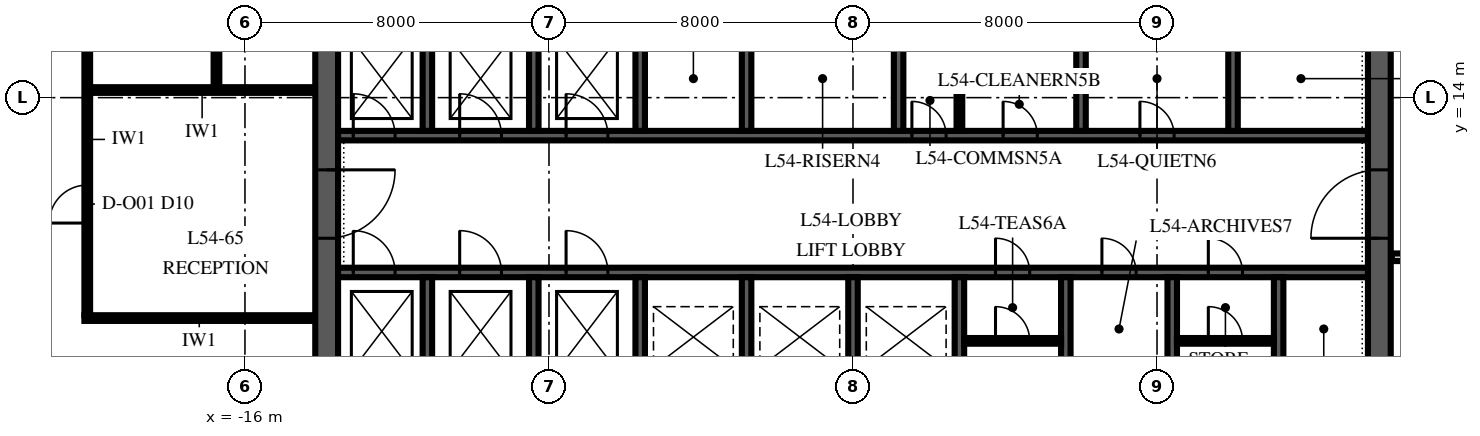
"""IFC4 building model, lengths in metres.
Left out: names, types, materials, properties, quantities, classifications, styles, units other than length and angle.
Written with IfcOpenShell. Run it as: python <this file> out.ifc"""

import sys

from ifc_helpers import new_model, si_unit, direction, frame, frame_2d, origin, place, context, subcontext, project, spatial, polyline, rectangle, outline, extrude, element, fill, save


model = new_model("IFC4")
c1 = context("Model", 3, precision=1e-05, world=origin(), true_north=direction((0.0, 1.0)))
c2 = subcontext(c1, "Body", "Model", "MODEL_VIEW")
j1 = project(units=[si_unit("LENGTHUNIT", "METRE"), si_unit("PLANEANGLEUNIT", "RADIAN")], contexts=[c1])
p1 = place(None, origin())
s1 = spatial("IfcSite", under=j1, at=p1, CompositionType="ELEMENT")
p2 = place(p1, origin())
s2 = spatial("IfcBuilding", under=s1, at=p2, CompositionType="ELEMENT")
p3 = place(p2, frame((0.0, 0.0, 234.0)))
s3 = spatial("IfcBuildingStorey", under=s2, at=p3, CompositionType="ELEMENT", Elevation=234.0)
p4 = place(p3, frame((13.85, 6.15, 0.0), z_axis=(0.0, 0.0, 1.0), x_axis=(0.0, 1.0, 0.0)))
e1 = element("IfcWall", 1, at=p4, inside=s3, PredefinedType="SHEAR", context=c2, shape_type="SweptSolid", body=[
    extrude(outline(polyline([(0.0, -0.3), (17.7, -0.3), (17.7, 0.0), (17.4, 0.0), (17.4, 0.3), (0.3, 0.3), (0.3, 0.0), (0.0, 0.0), (0.0, -0.3)])), origin(), (0.0, 0.0, 1.0), 4.0),
])
p5 = place(p4, frame((4.15, 0.0, 0.0)))
e2 = element("IfcOpeningElement", 2, at=p5, cuts=e1, PredefinedType="OPENING", context=c2, shape_type="SweptSolid", body=[
    extrude(rectangle(XDim=1.8, YDim=2.4, at=frame_2d((0.9, 1.2))), frame((0.0, 0.315, 0.0), z_axis=(0.0, -1.0, 0.0), x_axis=(1.0, 0.0, 0.0)), (0.0, 0.0, 1.0), 0.63),
])
p6 = place(p3, frame((-13.85, 23.85, 0.0), z_axis=(0.0, 0.0, 1.0), x_axis=(0.0, -1.0, 0.0)))
e3 = element("IfcWall", 3, at=p6, inside=s3, PredefinedType="SHEAR", context=c2, shape_type="SweptSolid", body=[
    extrude(outline(polyline([(0.0, -0.3), (17.7, -0.3), (17.7, 0.0), (17.4, 0.0), (17.4, 0.3), (0.3, 0.3), (0.3, 0.0), (0.0, 0.0), (0.0, -0.3)])), origin(), (0.0, 0.0, 1.0), 4.0),
])
p7 = place(p6, frame((11.75, 0.0, 0.0)))
e4 = element("IfcOpeningElement", 4, at=p7, cuts=e3, PredefinedType="OPENING", context=c2, shape_type="SweptSolid", body=[
    extrude(rectangle(XDim=1.8, YDim=2.4, at=frame_2d((0.9, 1.2))), frame((0.0, 0.315, 0.0), z_axis=(0.0, -1.0, 0.0), x_axis=(1.0, 0.0, 0.0)), (0.0, 0.0, 1.0), 0.63),
])
p8 = place(p3, frame((-13.55, 9.4, 0.0), z_axis=(0.0, 0.0, 1.0), x_axis=(1.0, 0.0, 0.0)))
e5 = element("IfcWall", 5, at=p8, inside=s3, PredefinedType="SHEAR", context=c2, shape_type="SweptSolid", body=[
    extrude(rectangle(XDim=27.1, YDim=0.25, at=frame_2d((13.55, 0.0))), origin(), (0.0, 0.0, 1.0), 4.0),
])
p9 = place(p8, frame((0.4, 0.0, 0.0)))
e6 = element("IfcOpeningElement", 6, at=p9, cuts=e5, PredefinedType="OPENING", context=c2, shape_type="SweptSolid", body=[
    extrude(rectangle(XDim=1.1, YDim=2.1, at=frame_2d((0.55, 1.05))), frame((0.0, 0.14, 0.0), z_axis=(0.0, -1.0, 0.0), x_axis=(1.0, 0.0, 0.0)), (0.0, 0.0, 1.0), 0.28),
])
p10 = place(p8, frame((3.2, 0.0, 0.0)))
e7 = element("IfcOpeningElement", 7, at=p10, cuts=e5, PredefinedType="OPENING", context=c2, shape_type="SweptSolid", body=[
    extrude(rectangle(XDim=1.1, YDim=2.1, at=frame_2d((0.55, 1.05))), frame((0.0, 0.14, 0.0), z_axis=(0.0, -1.0, 0.0), x_axis=(1.0, 0.0, 0.0)), (0.0, 0.0, 1.0), 0.28),
])
p11 = place(p8, frame((6.0, 0.0, 0.0)))
e8 = element("IfcOpeningElement", 8, at=p11, cuts=e5, PredefinedType="OPENING", context=c2, shape_type="SweptSolid", body=[
    extrude(rectangle(XDim=1.1, YDim=2.1, at=frame_2d((0.55, 1.05))), frame((0.0, 0.14, 0.0), z_axis=(0.0, -1.0, 0.0), x_axis=(1.0, 0.0, 0.0)), (0.0, 0.0, 1.0), 0.28),
])
p12 = place(p8, frame((17.3, 0.0, 0.0)))
e9 = element("IfcOpeningElement", 9, at=p12, cuts=e5, PredefinedType="OPENING", context=c2, shape_type="SweptSolid", body=[
    extrude(rectangle(XDim=0.9, YDim=2.1, at=frame_2d((0.45, 1.05))), frame((0.0, 0.14, 0.0), z_axis=(0.0, -1.0, 0.0), x_axis=(1.0, 0.0, 0.0)), (0.0, 0.0, 1.0), 0.28),
])
p13 = place(p8, frame((20.1, 0.0, 0.0)))
e10 = element("IfcOpeningElement", 10, at=p13, cuts=e5, PredefinedType="OPENING", context=c2, shape_type="SweptSolid", body=[
    extrude(rectangle(XDim=0.9, YDim=2.1, at=frame_2d((0.45, 1.05))), frame((0.0, 0.14, 0.0), z_axis=(0.0, -1.0, 0.0), x_axis=(1.0, 0.0, 0.0)), (0.0, 0.0, 1.0), 0.28),
])
p14 = place(p8, frame((22.9, 0.0, 0.0)))
e11 = element("IfcOpeningElement", 11, at=p14, cuts=e5, PredefinedType="OPENING", context=c2, shape_type="SweptSolid", body=[
    extrude(rectangle(XDim=0.9, YDim=2.1, at=frame_2d((0.45, 1.05))), frame((0.0, 0.14, 0.0), z_axis=(0.0, -1.0, 0.0), x_axis=(1.0, 0.0, 0.0)), (0.0, 0.0, 1.0), 0.28),
])
p15 = place(p3, frame((-13.55, 13.0, 0.0), z_axis=(0.0, 0.0, 1.0), x_axis=(1.0, 0.0, 0.0)))
e12 = element("IfcWall", 12, at=p15, inside=s3, PredefinedType="SHEAR", context=c2, shape_type="SweptSolid", body=[
    extrude(rectangle(XDim=27.1, YDim=0.25, at=frame_2d((13.55, 0.0))), origin(), (0.0, 0.0, 1.0), 4.0),
])
p16 = place(p15, frame((0.4, 0.0, 0.0)))
e13 = element("IfcOpeningElement", 13, at=p16, cuts=e12, PredefinedType="OPENING", context=c2, shape_type="SweptSolid", body=[
    extrude(rectangle(XDim=1.1, YDim=2.1, at=frame_2d((0.55, 1.05))), frame((0.0, 0.14, 0.0), z_axis=(0.0, -1.0, 0.0), x_axis=(1.0, 0.0, 0.0)), (0.0, 0.0, 1.0), 0.28),
])
p17 = place(p15, frame((3.2, 0.0, 0.0)))
e14 = element("IfcOpeningElement", 14, at=p17, cuts=e12, PredefinedType="OPENING", context=c2, shape_type="SweptSolid", body=[
    extrude(rectangle(XDim=1.1, YDim=2.1, at=frame_2d((0.55, 1.05))), frame((0.0, 0.14, 0.0), z_axis=(0.0, -1.0, 0.0), x_axis=(1.0, 0.0, 0.0)), (0.0, 0.0, 1.0), 0.28),
])
p18 = place(p15, frame((6.0, 0.0, 0.0)))
e15 = element("IfcOpeningElement", 15, at=p18, cuts=e12, PredefinedType="OPENING", context=c2, shape_type="SweptSolid", body=[
    extrude(rectangle(XDim=1.1, YDim=2.1, at=frame_2d((0.55, 1.05))), frame((0.0, 0.14, 0.0), z_axis=(0.0, -1.0, 0.0), x_axis=(1.0, 0.0, 0.0)), (0.0, 0.0, 1.0), 0.28),
])
p19 = place(p15, frame((15.1, 0.0, 0.0)))
e16 = element("IfcOpeningElement", 16, at=p19, cuts=e12, PredefinedType="OPENING", context=c2, shape_type="SweptSolid", body=[
    extrude(rectangle(XDim=0.9, YDim=2.1, at=frame_2d((0.45, 1.05))), frame((0.0, 0.14, 0.0), z_axis=(0.0, -1.0, 0.0), x_axis=(1.0, 0.0, 0.0)), (0.0, 0.0, 1.0), 0.28),
])
p20 = place(p15, frame((17.5, 0.0, 0.0)))
e17 = element("IfcOpeningElement", 17, at=p20, cuts=e12, PredefinedType="OPENING", context=c2, shape_type="SweptSolid", body=[
    extrude(rectangle(XDim=0.9, YDim=2.1, at=frame_2d((0.45, 1.05))), frame((0.0, 0.14, 0.0), z_axis=(0.0, -1.0, 0.0), x_axis=(1.0, 0.0, 0.0)), (0.0, 0.0, 1.0), 0.28),
])
p21 = place(p15, frame((21.1, 0.0, 0.0)))
e18 = element("IfcOpeningElement", 18, at=p21, cuts=e12, PredefinedType="OPENING", context=c2, shape_type="SweptSolid", body=[
    extrude(rectangle(XDim=0.9, YDim=2.1, at=frame_2d((0.45, 1.05))), frame((0.0, 0.14, 0.0), z_axis=(0.0, -1.0, 0.0), x_axis=(1.0, 0.0, 0.0)), (0.0, 0.0, 1.0), 0.28),
])
for number, where, z_axis, x_axis in (
    (19, (-11.2, 6.45, 0.0), (0.0, 0.0, 1.0), (0.0, 1.0, 0.0)),
    (20, (-8.4, 6.45, 0.0), (0.0, 0.0, 1.0), (0.0, 1.0, 0.0)),
    (21, (-5.6, 6.45, 0.0), (0.0, 0.0, 1.0), (0.0, 1.0, 0.0)),
    (22, (-2.8, 6.45, 0.0), (0.0, 0.0, 1.0), (0.0, 1.0, 0.0)),
    (23, (0.0, 6.45, 0.0), (0.0, 0.0, 1.0), (0.0, 1.0, 0.0)),
    (24, (2.8, 6.45, 0.0), (0.0, 0.0, 1.0), (0.0, 1.0, 0.0)),
    (25, (5.6, 6.45, 0.0), (0.0, 0.0, 1.0), (0.0, 1.0, 0.0)),
    (26, (8.4, 6.45, 0.0), (0.0, 0.0, 1.0), (0.0, 1.0, 0.0)),
    (27, (11.2, 6.45, 0.0), (0.0, 0.0, 1.0), (0.0, 1.0, 0.0)),
):
    element("IfcWall", number, at=place(p3, frame(where, z_axis=z_axis, x_axis=x_axis)), inside=s3, PredefinedType="SHEAR", context=c2, shape_type="SweptSolid", body=[
        extrude(rectangle(XDim=2.825, YDim=0.25, at=frame_2d((1.413, 0.0))), origin(), (0.0, 0.0, 1.0), 4.0),
    ])
for number, where, z_axis, x_axis in (
    (28, (-11.2, 13.125, 0.0), (0.0, 0.0, 1.0), (0.0, 1.0, 0.0)),
    (29, (-8.4, 13.125, 0.0), (0.0, 0.0, 1.0), (0.0, 1.0, 0.0)),
    (30, (-5.6, 13.125, 0.0), (0.0, 0.0, 1.0), (0.0, 1.0, 0.0)),
    (31, (-2.8, 13.125, 0.0), (0.0, 0.0, 1.0), (0.0, 1.0, 0.0)),
    (32, (1.2, 13.125, 0.0), (0.0, 0.0, 1.0), (0.0, 1.0, 0.0)),
    (33, (6.0, 13.125, 0.0), (0.0, 0.0, 1.0), (0.0, 1.0, 0.0)),
    (34, (10.0, 13.125, 0.0), (0.0, 0.0, 1.0), (0.0, 1.0, 0.0)),
):
    element("IfcWall", number, at=place(p3, frame(where, z_axis=z_axis, x_axis=x_axis)), inside=s3, PredefinedType="SHEAR", context=c2, shape_type="SweptSolid", body=[
        extrude(rectangle(XDim=2.75, YDim=0.25, at=frame_2d((1.375, 0.0))), origin(), (0.0, 0.0, 1.0), 4.0),
    ])
p22 = place(p3, frame((2.8, 13.125, 0.0), z_axis=(0.0, 0.0, 1.0), x_axis=(0.0, 1.0, 0.0)))
e35 = element("IfcWall", 35, at=p22, inside=s3, PredefinedType="PARTITIONING", context=c2, shape_type="SweptSolid", body=[
    extrude(rectangle(XDim=1.55, YDim=0.15, at=frame_2d((0.775, 0.0))), origin(), (0.0, 0.0, 1.0), 3.85),
])
p23 = place(p3, frame((2.875, 14.6, 0.0), z_axis=(0.0, 0.0, 1.0), x_axis=(1.0, 0.0, 0.0)))
e36 = element("IfcWall", 36, at=p23, inside=s3, PredefinedType="PARTITIONING", context=c2, shape_type="SweptSolid", body=[
    extrude(rectangle(XDim=3.0, YDim=0.15, at=frame_2d((1.5, 0.0))), origin(), (0.0, 0.0, 1.0), 3.85),
])
p24 = place(p3, frame((2.925, 7.6, 0.0), z_axis=(0.0, 0.0, 1.0), x_axis=(1.0, 0.0, 0.0)))
e37 = element("IfcWall", 37, at=p24, inside=s3, PredefinedType="PARTITIONING", context=c2, shape_type="SweptSolid", body=[
    extrude(rectangle(XDim=2.55, YDim=0.15, at=frame_2d((1.275, 0.0))), origin(), (0.0, 0.0, 1.0), 3.85),
])
p25 = place(p24, frame((0.825, 0.0, 0.0)))
e38 = element("IfcOpeningElement", 38, at=p25, cuts=e37, PredefinedType="OPENING", context=c2, shape_type="SweptSolid", body=[
    extrude(rectangle(XDim=0.9, YDim=2.1, at=frame_2d((0.45, 1.05))), frame((0.0, 0.09, 0.0), z_axis=(0.0, -1.0, 0.0), x_axis=(1.0, 0.0, 0.0)), (0.0, 0.0, 1.0), 0.18),
])
p26 = place(p3, frame((8.525, 7.6, 0.0), z_axis=(0.0, 0.0, 1.0), x_axis=(1.0, 0.0, 0.0)))
e39 = element("IfcWall", 39, at=p26, inside=s3, PredefinedType="PARTITIONING", context=c2, shape_type="SweptSolid", body=[
    extrude(rectangle(XDim=2.55, YDim=0.15, at=frame_2d((1.275, 0.0))), origin(), (0.0, 0.0, 1.0), 3.85),
])
p27 = place(p26, frame((0.825, 0.0, 0.0)))
e40 = element("IfcOpeningElement", 40, at=p27, cuts=e39, PredefinedType="OPENING", context=c2, shape_type="SweptSolid", body=[
    extrude(rectangle(XDim=0.9, YDim=2.1, at=frame_2d((0.45, 1.05))), frame((0.0, 0.09, 0.0), z_axis=(0.0, -1.0, 0.0), x_axis=(1.0, 0.0, 0.0)), (0.0, 0.0, 1.0), 0.18),
])
p28 = place(p3, frame((-20.225, 8.2, 0.0), z_axis=(0.0, 0.0, 1.0), x_axis=(1.0, 0.0, 0.0)))
e41 = element("IfcWall", 41, at=p28, inside=s3, PredefinedType="PARTITIONING", context=c2, shape_type="SweptSolid", body=[
    extrude(rectangle(XDim=6.045, YDim=0.15, at=frame_2d((3.022, 0.0))), origin(), (0.0, 0.0, 1.0), 3.85),
])
p29 = place(p3, frame((14.18, 9.8, 0.0), z_axis=(0.0, 0.0, 1.0), x_axis=(1.0, 0.0, 0.0)))
e42 = element("IfcWall", 42, at=p29, inside=s3, PredefinedType="PARTITIONING", context=c2, shape_type="SweptSolid", body=[
    extrude(rectangle(XDim=2.02, YDim=0.2, at=frame_2d((1.01, 0.0))), origin(), (0.0, 0.0, 1.0), 3.85),
])
p30 = place(p3, frame((-20.075, 14.2, 0.0), z_axis=(0.0, 0.0, 1.0), x_axis=(1.0, 0.0, 0.0)))
e43 = element("IfcWall", 43, at=p30, inside=s3, PredefinedType="PARTITIONING", context=c2, shape_type="SweptSolid", body=[
    extrude(rectangle(XDim=5.895, YDim=0.15, at=frame_2d((2.948, 0.0))), origin(), (0.0, 0.0, 1.0), 3.25),
])
p31 = place(p3, frame((-20.15, 8.275, 0.0), z_axis=(0.0, 0.0, 1.0), x_axis=(0.0, 1.0, 0.0)))
e44 = element("IfcWall", 44, at=p31, inside=s3, PredefinedType="PARTITIONING", context=c2, shape_type="SweptSolid", body=[
    extrude(rectangle(XDim=9.25, YDim=0.15, at=frame_2d((4.625, 0.0))), origin(), (0.0, 0.0, 1.0), 3.25),
])
p32 = place(p31, frame((2.425, 0.0, 0.0)))
e45 = element("IfcOpeningElement", 45, at=p32, cuts=e44, PredefinedType="OPENING", context=c2, shape_type="SweptSolid", body=[
    extrude(rectangle(XDim=1.0, YDim=2.3, at=frame_2d((0.5, 1.15))), frame((0.0, 0.09, 0.0), z_axis=(0.0, -1.0, 0.0), x_axis=(1.0, 0.0, 0.0)), (0.0, 0.0, 1.0), 0.18),
])
p33 = place(p31, frame((7.125, 0.0, 0.0)))
e46 = element("IfcOpeningElement", 46, at=p33, cuts=e44, PredefinedType="OPENING", context=c2, shape_type="SweptSolid", body=[
    extrude(rectangle(XDim=1.0, YDim=2.3, at=frame_2d((0.5, 1.15))), frame((0.0, 0.09, 0.0), z_axis=(0.0, -1.0, 0.0), x_axis=(1.0, 0.0, 0.0)), (0.0, 0.0, 1.0), 0.18),
])
p34 = place(p3, frame((-16.75, 14.275, 0.0), z_axis=(0.0, 0.0, 1.0), x_axis=(0.0, 1.0, 0.0)))
e47 = element("IfcWall", 47, at=p34, inside=s3, PredefinedType="PARTITIONING", context=c2, shape_type="SweptSolid", body=[
    extrude(rectangle(XDim=3.25, YDim=0.15, at=frame_2d((1.625, 0.0))), origin(), (0.0, 0.0, 1.0), 3.25),
])
p35 = place(p5, origin())
e48 = element("IfcDoor", 48, at=p35, inside=s3, OperationType="DOUBLE_DOOR_SINGLE_SWING", PredefinedType="DOOR", context=c2, shape_type="SweptSolid", body=[
    extrude(rectangle(XDim=1.8, YDim=2.4, at=frame_2d((0.9, 1.2))), frame((0.0, 0.3, 0.0), z_axis=(0.0, -1.0, 0.0), x_axis=(1.0, 0.0, 0.0)), (0.0, 0.0, 1.0), 0.6),
])
fill(e2, e48)
p36 = place(p7, origin())
e49 = element("IfcDoor", 49, at=p36, inside=s3, OperationType="DOUBLE_DOOR_SINGLE_SWING", PredefinedType="DOOR", context=c2, shape_type="SweptSolid", body=[
    extrude(rectangle(XDim=1.8, YDim=2.4, at=frame_2d((0.9, 1.2))), frame((0.0, 0.3, 0.0), z_axis=(0.0, -1.0, 0.0), x_axis=(1.0, 0.0, 0.0)), (0.0, 0.0, 1.0), 0.6),
])
fill(e4, e49)
p37 = place(p9, origin())
e50 = element("IfcDoor", 50, at=p37, inside=s3, OperationType="SLIDING_TO_LEFT", PredefinedType="DOOR", context=c2, shape_type="SweptSolid", body=[
    extrude(rectangle(XDim=1.1, YDim=2.1, at=frame_2d((0.55, 1.05))), frame((0.0, 0.125, 0.0), z_axis=(0.0, -1.0, 0.0), x_axis=(1.0, 0.0, 0.0)), (0.0, 0.0, 1.0), 0.25),
])
fill(e6, e50)
p38 = place(p10, origin())
e51 = element("IfcDoor", 51, at=p38, inside=s3, OperationType="SLIDING_TO_LEFT", PredefinedType="DOOR", context=c2, shape_type="SweptSolid", body=[
    extrude(rectangle(XDim=1.1, YDim=2.1, at=frame_2d((0.55, 1.05))), frame((0.0, 0.125, 0.0), z_axis=(0.0, -1.0, 0.0), x_axis=(1.0, 0.0, 0.0)), (0.0, 0.0, 1.0), 0.25),
])
fill(e7, e51)
p39 = place(p11, origin())
e52 = element("IfcDoor", 52, at=p39, inside=s3, OperationType="SLIDING_TO_LEFT", PredefinedType="DOOR", context=c2, shape_type="SweptSolid", body=[
    extrude(rectangle(XDim=1.1, YDim=2.1, at=frame_2d((0.55, 1.05))), frame((0.0, 0.125, 0.0), z_axis=(0.0, -1.0, 0.0), x_axis=(1.0, 0.0, 0.0)), (0.0, 0.0, 1.0), 0.25),
])
fill(e8, e52)
p40 = place(p16, origin())
e53 = element("IfcDoor", 53, at=p40, inside=s3, OperationType="SLIDING_TO_LEFT", PredefinedType="DOOR", context=c2, shape_type="SweptSolid", body=[
    extrude(rectangle(XDim=1.1, YDim=2.1, at=frame_2d((0.55, 1.05))), frame((0.0, 0.125, 0.0), z_axis=(0.0, -1.0, 0.0), x_axis=(1.0, 0.0, 0.0)), (0.0, 0.0, 1.0), 0.25),
])
fill(e13, e53)
p41 = place(p17, origin())
e54 = element("IfcDoor", 54, at=p41, inside=s3, OperationType="SLIDING_TO_LEFT", PredefinedType="DOOR", context=c2, shape_type="SweptSolid", body=[
    extrude(rectangle(XDim=1.1, YDim=2.1, at=frame_2d((0.55, 1.05))), frame((0.0, 0.125, 0.0), z_axis=(0.0, -1.0, 0.0), x_axis=(1.0, 0.0, 0.0)), (0.0, 0.0, 1.0), 0.25),
])
fill(e14, e54)
p42 = place(p18, origin())
e55 = element("IfcDoor", 55, at=p42, inside=s3, OperationType="SLIDING_TO_LEFT", PredefinedType="DOOR", context=c2, shape_type="SweptSolid", body=[
    extrude(rectangle(XDim=1.1, YDim=2.1, at=frame_2d((0.55, 1.05))), frame((0.0, 0.125, 0.0), z_axis=(0.0, -1.0, 0.0), x_axis=(1.0, 0.0, 0.0)), (0.0, 0.0, 1.0), 0.25),
])
fill(e15, e55)
p43 = place(p19, origin())
e56 = element("IfcDoor", 56, at=p43, inside=s3, OperationType="SINGLE_SWING_LEFT", PredefinedType="DOOR", context=c2, shape_type="SweptSolid", body=[
    extrude(rectangle(XDim=0.9, YDim=2.1, at=frame_2d((0.45, 1.05))), frame((0.0, 0.125, 0.0), z_axis=(0.0, -1.0, 0.0), x_axis=(1.0, 0.0, 0.0)), (0.0, 0.0, 1.0), 0.25),
])
fill(e16, e56)
p44 = place(p20, origin())
e57 = element("IfcDoor", 57, at=p44, inside=s3, OperationType="SINGLE_SWING_LEFT", PredefinedType="DOOR", context=c2, shape_type="SweptSolid", body=[
    extrude(rectangle(XDim=0.9, YDim=2.1, at=frame_2d((0.45, 1.05))), frame((0.0, 0.125, 0.0), z_axis=(0.0, -1.0, 0.0), x_axis=(1.0, 0.0, 0.0)), (0.0, 0.0, 1.0), 0.25),
])
fill(e17, e57)
p45 = place(p21, origin())
e58 = element("IfcDoor", 58, at=p45, inside=s3, OperationType="SINGLE_SWING_LEFT", PredefinedType="DOOR", context=c2, shape_type="SweptSolid", body=[
    extrude(rectangle(XDim=0.9, YDim=2.1, at=frame_2d((0.45, 1.05))), frame((0.0, 0.125, 0.0), z_axis=(0.0, -1.0, 0.0), x_axis=(1.0, 0.0, 0.0)), (0.0, 0.0, 1.0), 0.25),
])
fill(e18, e58)
p46 = place(p12, origin())
e59 = element("IfcDoor", 59, at=p46, inside=s3, OperationType="SINGLE_SWING_LEFT", PredefinedType="DOOR", context=c2, shape_type="SweptSolid", body=[
    extrude(rectangle(XDim=0.9, YDim=2.1, at=frame_2d((0.45, 1.05))), frame((0.0, 0.125, 0.0), z_axis=(0.0, -1.0, 0.0), x_axis=(1.0, 0.0, 0.0)), (0.0, 0.0, 1.0), 0.25),
])
fill(e9, e59)
p47 = place(p25, origin())
e60 = element("IfcDoor", 60, at=p47, inside=s3, OperationType="SINGLE_SWING_LEFT", PredefinedType="DOOR", context=c2, shape_type="SweptSolid", body=[
    extrude(rectangle(XDim=0.9, YDim=2.1, at=frame_2d((0.45, 1.05))), frame((0.0, 0.075, 0.0), z_axis=(0.0, -1.0, 0.0), x_axis=(1.0, 0.0, 0.0)), (0.0, 0.0, 1.0), 0.149),
])
fill(e38, e60)
p48 = place(p13, origin())
e61 = element("IfcDoor", 61, at=p48, inside=s3, OperationType="SINGLE_SWING_LEFT", PredefinedType="DOOR", context=c2, shape_type="SweptSolid", body=[
    extrude(rectangle(XDim=0.9, YDim=2.1, at=frame_2d((0.45, 1.05))), frame((0.0, 0.125, 0.0), z_axis=(0.0, -1.0, 0.0), x_axis=(1.0, 0.0, 0.0)), (0.0, 0.0, 1.0), 0.25),
])
fill(e10, e61)
p49 = place(p14, origin())
e62 = element("IfcDoor", 62, at=p49, inside=s3, OperationType="SINGLE_SWING_LEFT", PredefinedType="DOOR", context=c2, shape_type="SweptSolid", body=[
    extrude(rectangle(XDim=0.9, YDim=2.1, at=frame_2d((0.45, 1.05))), frame((0.0, 0.125, 0.0), z_axis=(0.0, -1.0, 0.0), x_axis=(1.0, 0.0, 0.0)), (0.0, 0.0, 1.0), 0.25),
])
fill(e11, e62)
p50 = place(p27, origin())
e63 = element("IfcDoor", 63, at=p50, inside=s3, OperationType="SINGLE_SWING_LEFT", PredefinedType="DOOR", context=c2, shape_type="SweptSolid", body=[
    extrude(rectangle(XDim=0.9, YDim=2.1, at=frame_2d((0.45, 1.05))), frame((0.0, 0.075, 0.0), z_axis=(0.0, -1.0, 0.0), x_axis=(1.0, 0.0, 0.0)), (0.0, 0.0, 1.0), 0.149),
])
fill(e40, e63)
p51 = place(p32, origin())
e64 = element("IfcDoor", 64, at=p51, inside=s3, OperationType="SINGLE_SWING_LEFT", PredefinedType="DOOR", context=c2, shape_type="SweptSolid", body=[
    extrude(rectangle(XDim=1.0, YDim=2.3, at=frame_2d((0.5, 1.15))), frame((0.0, 0.075, 0.0), z_axis=(0.0, -1.0, 0.0), x_axis=(1.0, 0.0, 0.0)), (0.0, 0.0, 1.0), 0.149),
])
fill(e45, e64)
save(model, sys.argv[1])
